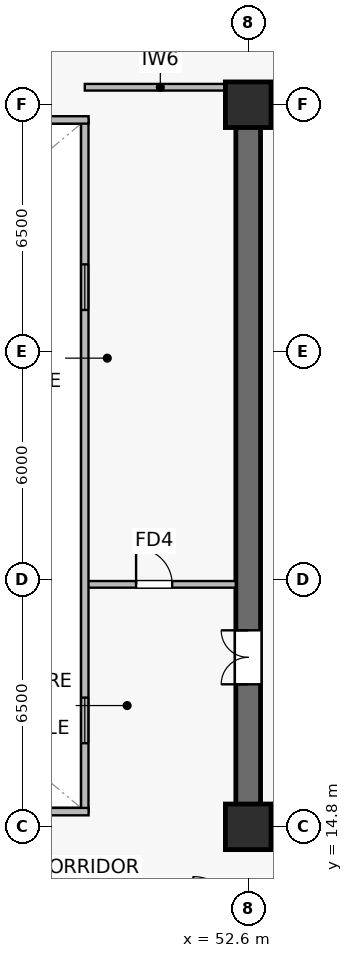
"""IFC4 building model, lengths in metres.
Left out: names, types, materials, properties, quantities, classifications, styles, units other than length and angle.
Written with IfcOpenShell. Run it as: python <this file> out.ifc"""

import sys

from ifc_helpers import new_model, si_unit, direction, frame, frame_2d, origin, origin_2d, place, context, subcontext, project, spatial, rectangle, extrude, source, transform, mapped, element, fill, save


model = new_model("IFC4")
c1 = context("Model", 3, precision=1e-05, world=origin(), true_north=direction((0.0, 1.0)))
c2 = subcontext(c1, "Body", "Model", "MODEL_VIEW")
j1 = project(units=[si_unit("LENGTHUNIT", "METRE"), si_unit("PLANEANGLEUNIT", "RADIAN")], contexts=[c1])
p1 = place(None, origin())
s1 = spatial("IfcSite", under=j1, at=p1, CompositionType="ELEMENT")
p2 = place(p1, origin())
s2 = spatial("IfcBuilding", under=s1, at=p2, CompositionType="ELEMENT")
p3 = place(p2, frame((0.0, 0.0, 105.1)))
s3 = spatial("IfcBuildingStorey", under=s2, at=p3, CompositionType="ELEMENT", Elevation=105.1)
p4 = place(p3, frame((52.275, 14.8, 0.0), z_axis=(0.0, 0.0, 1.0), x_axis=(1.0, 0.0, 0.0)))
e1 = element("IfcWall", 1, at=p4, inside=s3, PredefinedType="SHEAR", context=c2, shape_type="SweptSolid", body=[
    extrude(rectangle(XDim=15.45, YDim=0.65, at=frame_2d((7.725, 0.0))), origin(), (0.0, 0.0, 1.0), 3.79),
])
p5 = place(p3, frame((52.275, 33.8, 0.0), z_axis=(0.0, 0.0, 1.0), x_axis=(1.0, 0.0, 0.0)))
e2 = element("IfcWall", 2, at=p5, inside=s3, PredefinedType="SHEAR", context=c2, shape_type="SweptSolid", body=[
    extrude(rectangle(XDim=15.45, YDim=0.65, at=frame_2d((7.725, 0.0))), origin(), (0.0, 0.0, 1.0), 3.79),
])
p6 = place(p5, frame((9.25, 0.0, 0.0)))
e3 = element("IfcOpeningElement", 3, at=p6, cuts=e2, PredefinedType="OPENING", context=c2, shape_type="SweptSolid", body=[
    extrude(rectangle(XDim=0.95, YDim=2.15, at=frame_2d((0.475, 1.075))), frame((0.0, 0.335, 0.0), z_axis=(0.0, -1.0, 0.0), x_axis=(1.0, 0.0, 0.0)), (0.0, 0.0, 1.0), 0.67),
])
p7 = place(p5, frame((6.735, 0.0, 0.0)))
e4 = element("IfcOpeningElement", 4, at=p7, cuts=e2, PredefinedType="OPENING", context=c2, shape_type="SweptSolid", body=[
    extrude(rectangle(XDim=0.95, YDim=2.15, at=frame_2d((0.475, 1.075))), frame((0.0, 0.335, 0.0), z_axis=(0.0, -1.0, 0.0), x_axis=(1.0, 0.0, 0.0)), (0.0, 0.0, 1.0), 0.67),
])
p8 = place(p5, frame((4.185, 0.0, 0.0)))
e5 = element("IfcOpeningElement", 5, at=p8, cuts=e2, PredefinedType="OPENING", context=c2, shape_type="SweptSolid", body=[
    extrude(rectangle(XDim=0.95, YDim=2.15, at=frame_2d((0.475, 1.075))), frame((0.0, 0.335, 0.0), z_axis=(0.0, -1.0, 0.0), x_axis=(1.0, 0.0, 0.0)), (0.0, 0.0, 1.0), 0.67),
])
p9 = place(p5, frame((1.635, 0.0, 0.0)))
e6 = element("IfcOpeningElement", 6, at=p9, cuts=e2, PredefinedType="OPENING", context=c2, shape_type="SweptSolid", body=[
    extrude(rectangle(XDim=0.95, YDim=2.15, at=frame_2d((0.475, 1.075))), frame((0.0, 0.335, 0.0), z_axis=(0.0, -1.0, 0.0), x_axis=(1.0, 0.0, 0.0)), (0.0, 0.0, 1.0), 0.67),
])
p10 = place(p3, frame((52.6, 15.125, 0.0), z_axis=(0.0, 0.0, 1.0), x_axis=(0.0, 1.0, 0.0)))
e7 = element("IfcWall", 7, at=p10, inside=s3, PredefinedType="SHEAR", context=c2, shape_type="SweptSolid", body=[
    extrude(rectangle(XDim=18.35, YDim=0.65, at=frame_2d((9.175, 0.0))), origin(), (0.0, 0.0, 1.0), 3.79),
])
p11 = place(p10, frame((3.425, 0.0, 0.0)))
e8 = element("IfcOpeningElement", 8, at=p11, cuts=e7, PredefinedType="OPENING", context=c2, shape_type="SweptSolid", body=[
    extrude(rectangle(XDim=1.42, YDim=2.2, at=frame_2d((0.71, 1.1))), frame((0.0, 0.335, 0.0), z_axis=(0.0, -1.0, 0.0), x_axis=(1.0, 0.0, 0.0)), (0.0, 0.0, 1.0), 0.67),
])
m1 = source(origin(), c2, "Body", "SweptSolid", [
    extrude(rectangle(XDim=1.2, YDim=1.2, at=origin_2d()), origin(), (0.0, 0.0, 1.0), 4.1),
])
for number, where, z_axis, x_axis in (
    (9, (52.6, 14.8, 0.0), (0.0, 0.0, 1.0), (1.0, 0.0, 0.0)),
    (10, (52.6, 33.8, 0.0), (0.0, 0.0, 1.0), (1.0, 0.0, 0.0)),
):
    element("IfcColumn", number, at=place(p3, frame(where, z_axis=z_axis, x_axis=x_axis)), inside=s3, PredefinedType="COLUMN", context=c2, shape_type="MappedRepresentation", body=[
        mapped(m1, transform((0.0, 0.0, 0.0), scale=1.0)),
    ])
p12 = place(p3, frame((48.3, 34.26, 0.0), z_axis=(0.0, 0.0, 1.0), x_axis=(1.0, 0.0, 0.0)))
e11 = element("IfcWall", 11, at=p12, inside=s3, PredefinedType="PARTITIONING", context=c2, shape_type="SweptSolid", body=[
    extrude(rectangle(XDim=3.975, YDim=0.175, at=frame_2d((1.987, 0.0))), origin(), (0.0, 0.0, 1.0), 3.475),
])
p13 = place(p3, frame((48.3, 21.18, 0.0), z_axis=(0.0, 0.0, 1.0), x_axis=(1.0, 0.0, 0.0)))
e12 = element("IfcWall", 12, at=p13, inside=s3, PredefinedType="PARTITIONING", context=c2, shape_type="SweptSolid", body=[
    extrude(rectangle(XDim=3.975, YDim=0.175, at=frame_2d((1.987, 0.0))), origin(), (0.0, 0.0, 1.0), 3.79),
])
p14 = place(p13, frame((1.35, 0.0, 0.0)))
e13 = element("IfcOpeningElement", 13, at=p14, cuts=e12, PredefinedType="OPENING", context=c2, shape_type="SweptSolid", body=[
    extrude(rectangle(XDim=0.95, YDim=2.15, at=frame_2d((0.475, 1.075))), frame((0.0, 0.098, 0.0), z_axis=(0.0, -1.0, 0.0), x_axis=(1.0, 0.0, 0.0)), (0.0, 0.0, 1.0), 0.195),
])
p15 = place(p3, frame((48.3, 15.2, 0.0), z_axis=(0.0, 0.0, 1.0), x_axis=(0.0, 1.0, 0.0)))
e14 = element("IfcWall", 14, at=p15, inside=s3, PredefinedType="SOLIDWALL", context=c2, shape_type="SweptSolid", body=[
    extrude(rectangle(XDim=18.2, YDim=0.195, at=frame_2d((9.1, 0.0))), origin(), (0.0, 0.0, 1.0), 3.79),
])
p16 = place(p15, frame((1.8, 0.0, 0.9)))
e15 = element("IfcOpeningElement", 15, at=p16, cuts=e14, PredefinedType="OPENING", context=c2, shape_type="SweptSolid", body=[
    extrude(rectangle(XDim=1.2, YDim=1.35, at=frame_2d((0.6, 0.675))), frame((0.0, 0.107, 0.0), z_axis=(0.0, -1.0, 0.0), x_axis=(1.0, 0.0, 0.0)), (0.0, 0.0, 1.0), 0.215),
])
p17 = place(p15, frame((13.2, 0.0, 0.9)))
e16 = element("IfcOpeningElement", 16, at=p17, cuts=e14, PredefinedType="OPENING", context=c2, shape_type="SweptSolid", body=[
    extrude(rectangle(XDim=1.2, YDim=1.35, at=frame_2d((0.6, 0.675))), frame((0.0, 0.107, 0.0), z_axis=(0.0, -1.0, 0.0), x_axis=(1.0, 0.0, 0.0)), (0.0, 0.0, 1.0), 0.215),
])
for number, where, z_axis, x_axis in (
    (17, (26.4, 15.2, 0.0), (0.0, 0.0, 1.0), (1.0, 0.0, 0.0)),
    (18, (26.4, 33.4, 0.0), (0.0, 0.0, 1.0), (1.0, 0.0, 0.0)),
):
    element("IfcWall", number, at=place(p3, frame(where, z_axis=z_axis, x_axis=x_axis)), inside=s3, PredefinedType="SOLIDWALL", context=c2, shape_type="SweptSolid", body=[
        extrude(rectangle(XDim=22.0, YDim=0.195, at=frame_2d((11.0, 0.0))), origin(), (0.0, 0.0, 1.0), 3.79),
    ])
m2 = source(origin(), c2, "Body", "SweptSolid", [
    extrude(rectangle(XDim=1.2, YDim=1.35, at=frame_2d((0.6, 0.675))), frame((0.0, 0.03, 0.0), z_axis=(0.0, -1.0, 0.0), x_axis=(1.0, 0.0, 0.0)), (0.0, 0.0, 1.0), 0.06),
])
p18 = place(p16, origin())
e19 = element("IfcWindow", 19, at=p18, inside=s3, PartitioningType="SINGLE_PANEL", PredefinedType="WINDOW", context=c2, shape_type="MappedRepresentation", body=[
    mapped(m2, transform((0.0, 0.0, 0.0), scale=1.0)),
])
fill(e15, e19)
p19 = place(p17, origin())
e20 = element("IfcWindow", 20, at=p19, inside=s3, PartitioningType="SINGLE_PANEL", PredefinedType="WINDOW", context=c2, shape_type="MappedRepresentation", body=[
    mapped(m2, transform((0.0, 0.0, 0.0), scale=1.0)),
])
fill(e16, e20)
m3 = source(origin(), c2, "Body", "SweptSolid", [
    extrude(rectangle(XDim=1.42, YDim=2.2, at=frame_2d((0.71, 1.1))), frame((0.0, 0.025, 0.0), z_axis=(0.0, -1.0, 0.0), x_axis=(1.0, 0.0, 0.0)), (0.0, 0.0, 1.0), 0.05),
])
p20 = place(p11, origin())
e21 = element("IfcDoor", 21, at=p20, inside=s3, OperationType="DOUBLE_DOOR_SINGLE_SWING", PredefinedType="DOOR", context=c2, shape_type="MappedRepresentation", body=[
    mapped(m3, transform((0.0, 0.0, 0.0), scale=1.0)),
])
fill(e8, e21)
m4 = source(origin(), c2, "Body", "SweptSolid", [
    extrude(rectangle(XDim=0.95, YDim=2.15, at=frame_2d((0.475, 1.075))), frame((0.0, 0.025, 0.0), z_axis=(0.0, -1.0, 0.0), x_axis=(1.0, 0.0, 0.0)), (0.0, 0.0, 1.0), 0.05),
])
p21 = place(p14, origin())
e22 = element("IfcDoor", 22, at=p21, inside=s3, OperationType="SINGLE_SWING_LEFT", PredefinedType="DOOR", context=c2, shape_type="MappedRepresentation", body=[
    mapped(m4, transform((0.0, 0.0, 0.0), scale=1.0)),
])
fill(e13, e22)
save(model, sys.argv[1])
